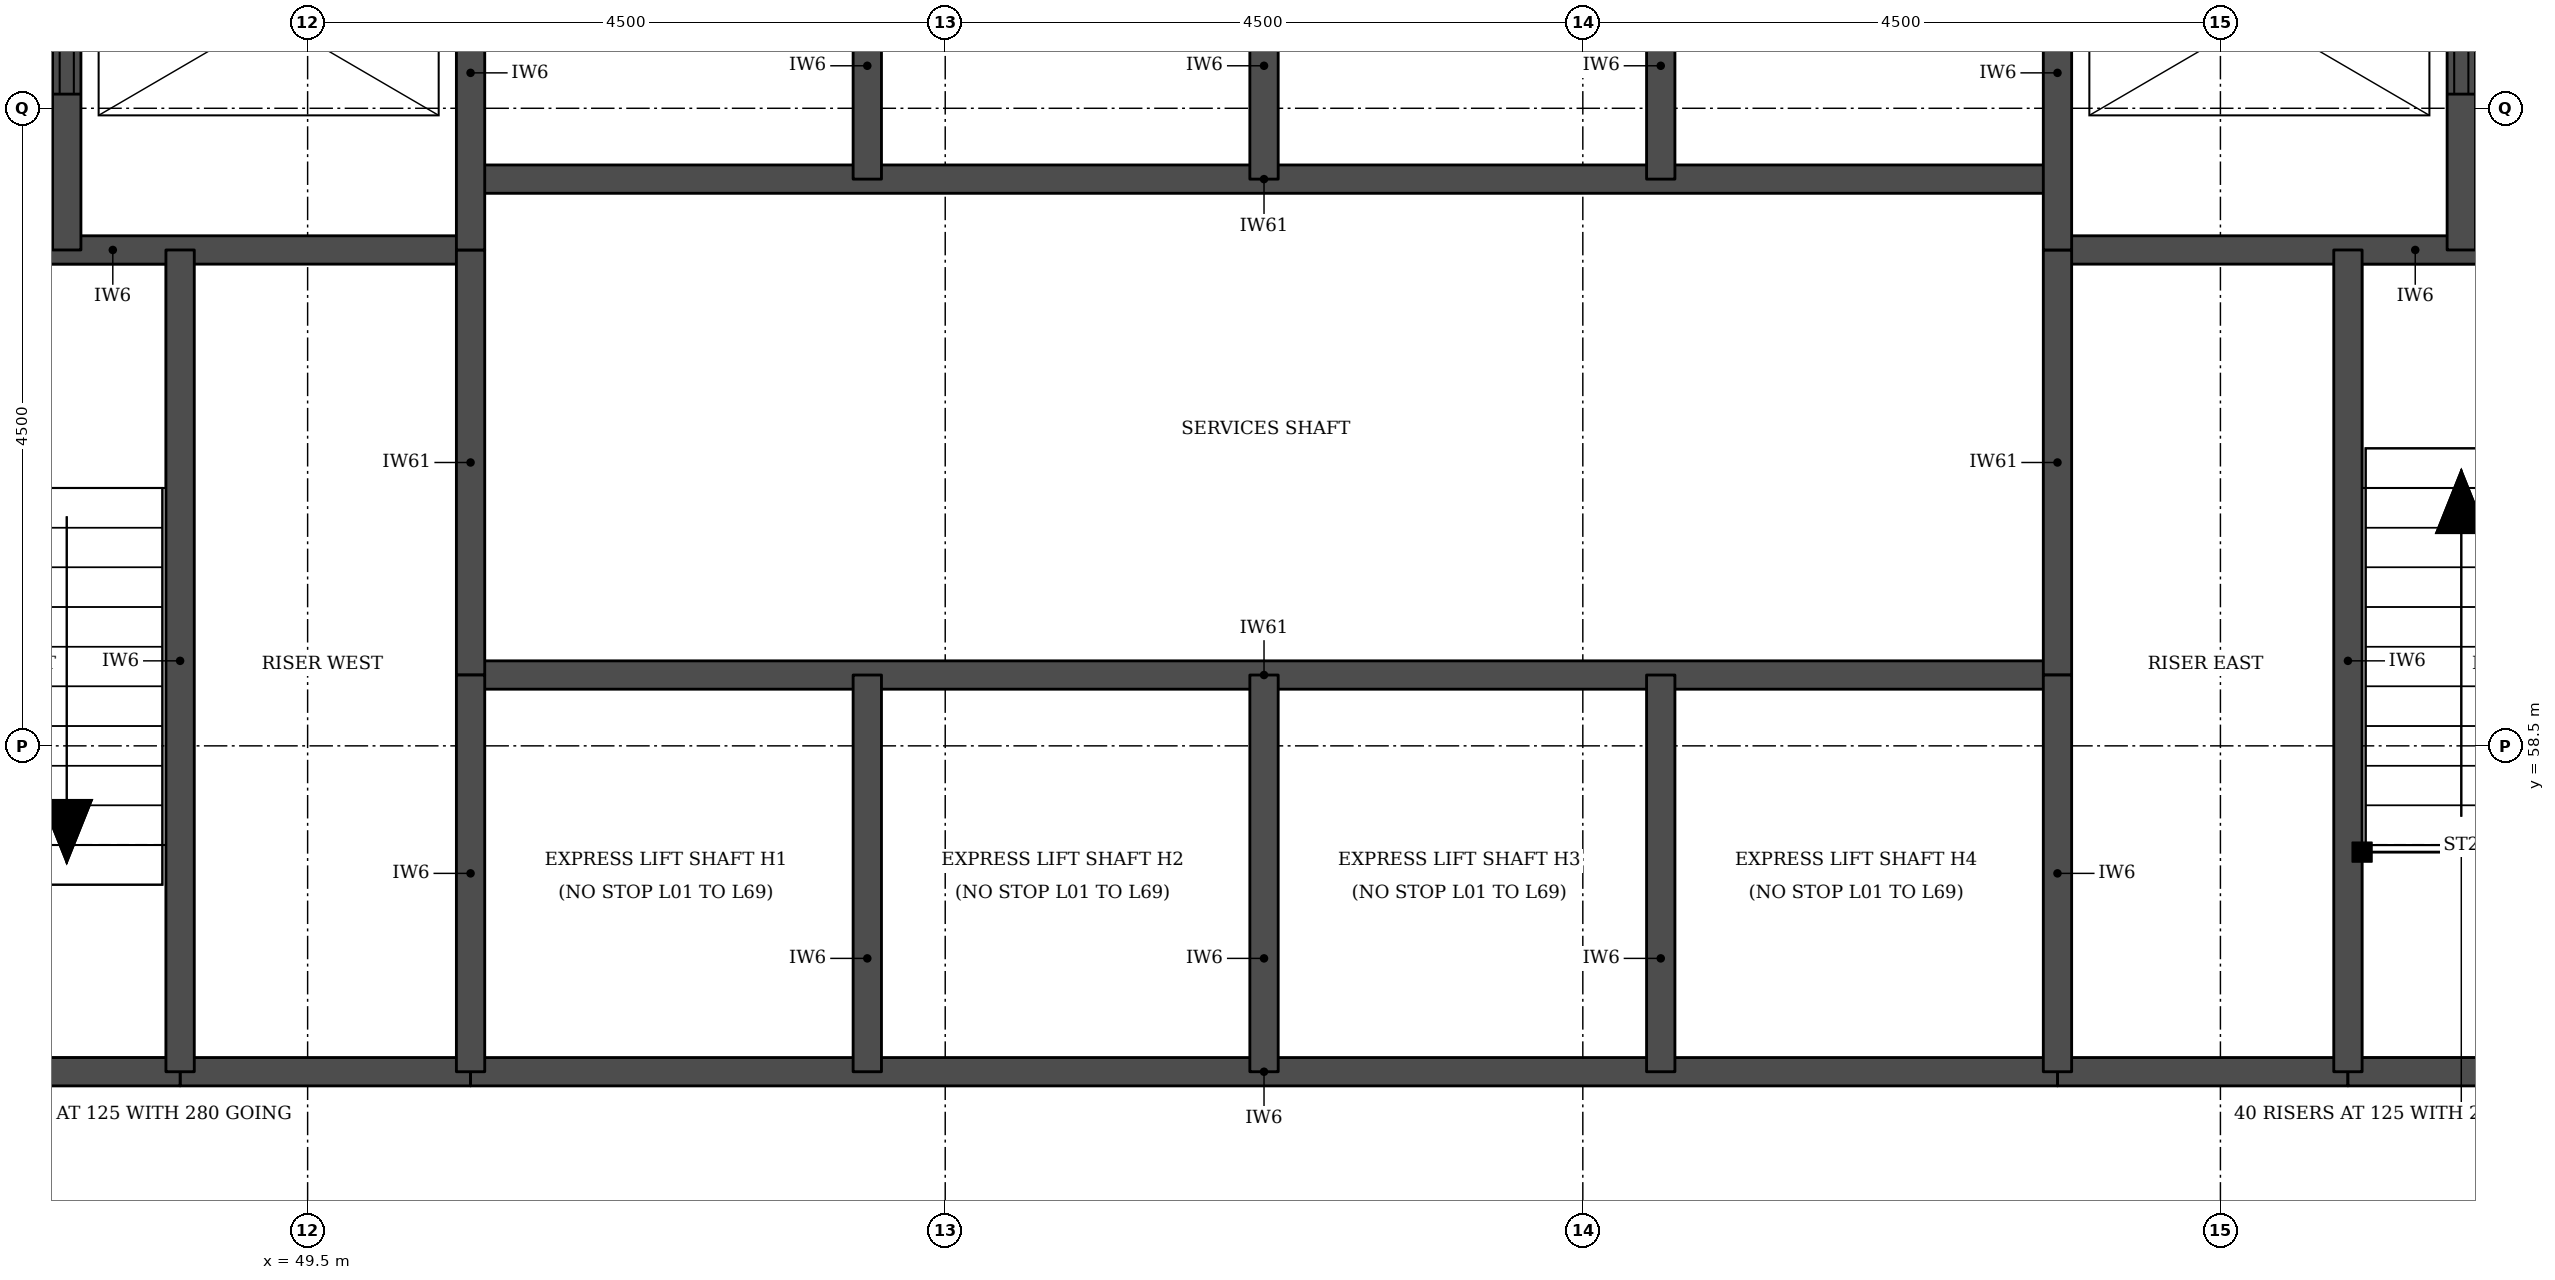
"""IFC4 building model, lengths in metres.
Left out: names, types, materials, properties, quantities, classifications, styles, units other than length and angle.
Written with IfcOpenShell. Run it as: python <this file> out.ifc"""

import sys

from ifc_helpers import new_model, si_unit, direction, frame, frame_2d, origin, place, context, subcontext, project, spatial, rectangle, extrude, element, fill, save


model = new_model("IFC4")
c1 = context("Model", 3, precision=1e-05, world=origin(), true_north=direction((0.0, 1.0)))
c2 = subcontext(c1, "Body", "Model", "MODEL_VIEW")
j1 = project(units=[si_unit("LENGTHUNIT", "METRE"), si_unit("PLANEANGLEUNIT", "RADIAN")], contexts=[c1])
p1 = place(None, origin())
s1 = spatial("IfcSite", under=j1, at=p1, CompositionType="ELEMENT")
p2 = place(p1, origin())
s2 = spatial("IfcBuilding", under=s1, at=p2, CompositionType="ELEMENT")
p3 = place(p2, frame((0.0, 0.0, 13.5)))
s3 = spatial("IfcBuildingStorey", under=s2, at=p3, CompositionType="ELEMENT", Elevation=13.5)
for number, where, z_axis, x_axis in (
    (1, (48.6, 56.2, 0.0), (0.0, 0.0, 1.0), (1.0, 0.0, 0.0)),
    (2, (61.85, 56.2, 0.0), (0.0, 0.0, 1.0), (1.0, 0.0, 0.0)),
):
    element("IfcWall", number, at=place(p3, frame(where, z_axis=z_axis, x_axis=x_axis)), inside=s3, PredefinedType="SOLIDWALL", context=c2, shape_type="SweptSolid", body=[
        extrude(rectangle(XDim=2.05, YDim=0.2, at=frame_2d((1.025, 0.0))), origin(), (0.0, 0.0, 1.0), 4.78),
    ])
p4 = place(p3, frame((45.6, 56.2, 0.0), z_axis=(0.0, 0.0, 1.0), x_axis=(1.0, 0.0, 0.0)))
e3 = element("IfcWall", 3, at=p4, inside=s3, PredefinedType="SOLIDWALL", context=c2, shape_type="SweptSolid", body=[
    extrude(rectangle(XDim=3.0, YDim=0.2, at=frame_2d((1.5, 0.0))), origin(), (0.0, 0.0, 1.0), 4.78),
])
p5 = place(p3, frame((50.65, 56.2, 0.0), z_axis=(0.0, 0.0, 1.0), x_axis=(1.0, 0.0, 0.0)))
e4 = element("IfcWall", 4, at=p5, inside=s3, PredefinedType="SOLIDWALL", context=c2, shape_type="SweptSolid", body=[
    extrude(rectangle(XDim=11.2, YDim=0.2, at=frame_2d((5.6, 0.0))), origin(), (0.0, 0.0, 1.0), 4.78),
])
p6 = place(p3, frame((63.9, 56.2, 0.0), z_axis=(0.0, 0.0, 1.0), x_axis=(1.0, 0.0, 0.0)))
e5 = element("IfcWall", 5, at=p6, inside=s3, PredefinedType="SOLIDWALL", context=c2, shape_type="SweptSolid", body=[
    extrude(rectangle(XDim=3.0, YDim=0.2, at=frame_2d((1.5, 0.0))), origin(), (0.0, 0.0, 1.0), 4.78),
])
p7 = place(p3, frame((50.65, 59.0, 0.0), z_axis=(0.0, 0.0, 1.0), x_axis=(1.0, 0.0, 0.0)))
e6 = element("IfcWall", 6, at=p7, inside=s3, PredefinedType="SOLIDWALL", context=c2, shape_type="SweptSolid", body=[
    extrude(rectangle(XDim=11.2, YDim=0.2, at=frame_2d((5.6, 0.0))), origin(), (0.0, 0.0, 1.0), 5.0),
])
for number, where, z_axis, x_axis in (
    (7, (45.6, 62.0, 0.0), (0.0, 0.0, 1.0), (1.0, 0.0, 0.0)),
    (8, (61.85, 62.0, 0.0), (0.0, 0.0, 1.0), (1.0, 0.0, 0.0)),
):
    element("IfcWall", number, at=place(p3, frame(where, z_axis=z_axis, x_axis=x_axis)), inside=s3, PredefinedType="SOLIDWALL", context=c2, shape_type="SweptSolid", body=[
        extrude(rectangle(XDim=5.05, YDim=0.2, at=frame_2d((2.525, 0.0))), origin(), (0.0, 0.0, 1.0), 4.78),
    ])
p8 = place(p3, frame((50.65, 62.5, 0.0), z_axis=(0.0, 0.0, 1.0), x_axis=(1.0, 0.0, 0.0)))
e9 = element("IfcWall", 9, at=p8, inside=s3, PredefinedType="SOLIDWALL", context=c2, shape_type="SweptSolid", body=[
    extrude(rectangle(XDim=11.2, YDim=0.2, at=frame_2d((5.6, 0.0))), origin(), (0.0, 0.0, 1.0), 5.0),
])
p9 = place(p3, frame((47.8, 62.0, 0.0), z_axis=(0.0, 0.0, 1.0), x_axis=(0.0, 1.0, 0.0)))
e10 = element("IfcWall", 10, at=p9, inside=s3, PredefinedType="SOLIDWALL", context=c2, shape_type="SweptSolid", body=[
    extrude(rectangle(XDim=3.3, YDim=0.2, at=frame_2d((1.65, 0.0))), origin(), (0.0, 0.0, 1.0), 4.78),
])
p10 = place(p9, frame((1.1, 0.0, 0.0)))
e11 = element("IfcOpeningElement", 11, at=p10, cuts=e10, PredefinedType="OPENING", context=c2, shape_type="SweptSolid", body=[
    extrude(rectangle(XDim=1.1, YDim=2.1, at=frame_2d((0.55, 1.05))), frame((0.0, 0.11, 0.0), z_axis=(0.0, -1.0, 0.0), x_axis=(1.0, 0.0, 0.0)), (0.0, 0.0, 1.0), 0.22),
])
p11 = place(p3, frame((48.6, 56.2, 0.0), z_axis=(0.0, 0.0, 1.0), x_axis=(0.0, 1.0, 0.0)))
e12 = element("IfcWall", 12, at=p11, inside=s3, PredefinedType="SOLIDWALL", context=c2, shape_type="SweptSolid", body=[
    extrude(rectangle(XDim=5.8, YDim=0.2, at=frame_2d((2.9, 0.0))), origin(), (0.0, 0.0, 1.0), 4.78),
])
p12 = place(p3, frame((50.65, 59.0, 0.0), z_axis=(0.0, 0.0, 1.0), x_axis=(0.0, 1.0, 0.0)))
e13 = element("IfcWall", 13, at=p12, inside=s3, PredefinedType="SOLIDWALL", context=c2, shape_type="SweptSolid", body=[
    extrude(rectangle(XDim=3.0, YDim=0.2, at=frame_2d((1.5, 0.0))), origin(), (0.0, 0.0, 1.0), 5.0),
])
p13 = place(p3, frame((50.65, 56.2, 0.0), z_axis=(0.0, 0.0, 1.0), x_axis=(0.0, 1.0, 0.0)))
e14 = element("IfcWall", 14, at=p13, inside=s3, PredefinedType="SOLIDWALL", context=c2, shape_type="SweptSolid", body=[
    extrude(rectangle(XDim=2.8, YDim=0.2, at=frame_2d((1.4, 0.0))), origin(), (0.0, 0.0, 1.0), 4.78),
])
p14 = place(p3, frame((50.65, 62.0, 0.0), z_axis=(0.0, 0.0, 1.0), x_axis=(0.0, 1.0, 0.0)))
e15 = element("IfcWall", 15, at=p14, inside=s3, PredefinedType="SOLIDWALL", context=c2, shape_type="SweptSolid", body=[
    extrude(rectangle(XDim=3.3, YDim=0.2, at=frame_2d((1.65, 0.0))), origin(), (0.0, 0.0, 1.0), 4.78),
])
for number, where, z_axis, x_axis in (
    (16, (53.45, 56.2, 0.0), (0.0, 0.0, 1.0), (0.0, 1.0, 0.0)),
    (17, (53.45, 62.5, 0.0), (0.0, 0.0, 1.0), (0.0, 1.0, 0.0)),
    (18, (56.25, 56.2, 0.0), (0.0, 0.0, 1.0), (0.0, 1.0, 0.0)),
    (19, (56.25, 62.5, 0.0), (0.0, 0.0, 1.0), (0.0, 1.0, 0.0)),
    (20, (59.05, 56.2, 0.0), (0.0, 0.0, 1.0), (0.0, 1.0, 0.0)),
    (21, (59.05, 62.5, 0.0), (0.0, 0.0, 1.0), (0.0, 1.0, 0.0)),
):
    element("IfcWall", number, at=place(p3, frame(where, z_axis=z_axis, x_axis=x_axis)), inside=s3, PredefinedType="SOLIDWALL", context=c2, shape_type="SweptSolid", body=[
        extrude(rectangle(XDim=2.8, YDim=0.2, at=frame_2d((1.4, 0.0))), origin(), (0.0, 0.0, 1.0), 4.78),
    ])
p15 = place(p3, frame((61.85, 59.0, 0.0), z_axis=(0.0, 0.0, 1.0), x_axis=(0.0, 1.0, 0.0)))
e22 = element("IfcWall", 22, at=p15, inside=s3, PredefinedType="SOLIDWALL", context=c2, shape_type="SweptSolid", body=[
    extrude(rectangle(XDim=3.0, YDim=0.2, at=frame_2d((1.5, 0.0))), origin(), (0.0, 0.0, 1.0), 5.0),
])
p16 = place(p3, frame((61.85, 56.2, 0.0), z_axis=(0.0, 0.0, 1.0), x_axis=(0.0, 1.0, 0.0)))
e23 = element("IfcWall", 23, at=p16, inside=s3, PredefinedType="SOLIDWALL", context=c2, shape_type="SweptSolid", body=[
    extrude(rectangle(XDim=2.8, YDim=0.2, at=frame_2d((1.4, 0.0))), origin(), (0.0, 0.0, 1.0), 4.78),
])
p17 = place(p3, frame((61.85, 62.0, 0.0), z_axis=(0.0, 0.0, 1.0), x_axis=(0.0, 1.0, 0.0)))
e24 = element("IfcWall", 24, at=p17, inside=s3, PredefinedType="SOLIDWALL", context=c2, shape_type="SweptSolid", body=[
    extrude(rectangle(XDim=3.3, YDim=0.2, at=frame_2d((1.65, 0.0))), origin(), (0.0, 0.0, 1.0), 4.78),
])
p18 = place(p3, frame((63.9, 56.2, 0.0), z_axis=(0.0, 0.0, 1.0), x_axis=(0.0, 1.0, 0.0)))
e25 = element("IfcWall", 25, at=p18, inside=s3, PredefinedType="SOLIDWALL", context=c2, shape_type="SweptSolid", body=[
    extrude(rectangle(XDim=5.8, YDim=0.2, at=frame_2d((2.9, 0.0))), origin(), (0.0, 0.0, 1.0), 4.78),
])
p19 = place(p3, frame((64.7, 62.0, 0.0), z_axis=(0.0, 0.0, 1.0), x_axis=(0.0, 1.0, 0.0)))
e26 = element("IfcWall", 26, at=p19, inside=s3, PredefinedType="SOLIDWALL", context=c2, shape_type="SweptSolid", body=[
    extrude(rectangle(XDim=3.3, YDim=0.2, at=frame_2d((1.65, 0.0))), origin(), (0.0, 0.0, 1.0), 4.78),
])
p20 = place(p19, frame((1.1, 0.0, 0.0)))
e27 = element("IfcOpeningElement", 27, at=p20, cuts=e26, PredefinedType="OPENING", context=c2, shape_type="SweptSolid", body=[
    extrude(rectangle(XDim=1.1, YDim=2.1, at=frame_2d((0.55, 1.05))), frame((0.0, 0.11, 0.0), z_axis=(0.0, -1.0, 0.0), x_axis=(1.0, 0.0, 0.0)), (0.0, 0.0, 1.0), 0.22),
])
p21 = place(p10, origin())
e28 = element("IfcDoor", 28, at=p21, inside=s3, OperationType="DOUBLE_DOOR_SLIDING", PredefinedType="DOOR", context=c2, shape_type="SweptSolid", body=[
    extrude(rectangle(XDim=1.1, YDim=2.1, at=frame_2d((0.55, 1.05))), frame((0.0, 0.025, 0.0), z_axis=(0.0, -1.0, 0.0), x_axis=(1.0, 0.0, 0.0)), (0.0, 0.0, 1.0), 0.05),
])
fill(e11, e28)
p22 = place(p20, origin())
e29 = element("IfcDoor", 29, at=p22, inside=s3, OperationType="DOUBLE_DOOR_SLIDING", PredefinedType="DOOR", context=c2, shape_type="SweptSolid", body=[
    extrude(rectangle(XDim=1.1, YDim=2.1, at=frame_2d((0.55, 1.05))), frame((0.0, 0.025, 0.0), z_axis=(0.0, -1.0, 0.0), x_axis=(1.0, 0.0, 0.0)), (0.0, 0.0, 1.0), 0.05),
])
fill(e27, e29)
save(model, sys.argv[1])
